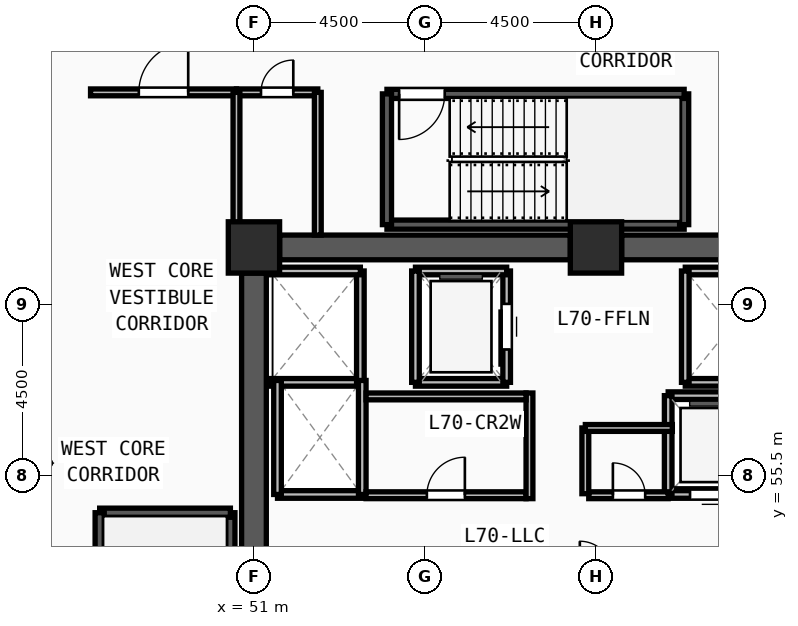
"""IFC4 building model, lengths in metres.
Left out: names, types, materials, properties, quantities, classifications, styles, units other than length and angle.
Written with IfcOpenShell. Run it as: python <this file> out.ifc"""

import sys

from ifc_helpers import new_model, si_unit, direction, frame, frame_2d, origin, origin_2d, place, context, subcontext, project, spatial, rectangle, extrude, source, transform, mapped, element, fill, save


model = new_model("IFC4")
c1 = context("Model", 3, precision=1e-05, world=origin(), true_north=direction((0.0, 1.0)))
c2 = subcontext(c1, "Body", "Model", "MODEL_VIEW")
j1 = project(units=[si_unit("LENGTHUNIT", "METRE"), si_unit("PLANEANGLEUNIT", "RADIAN")], contexts=[c1])
p1 = place(None, origin())
s1 = spatial("IfcSite", under=j1, at=p1, CompositionType="ELEMENT")
p2 = place(p1, origin())
s2 = spatial("IfcBuilding", under=s1, at=p2, CompositionType="ELEMENT")
p3 = place(p2, frame((0.0, 0.0, 270.0)))
s3 = spatial("IfcBuildingStorey", under=s2, at=p3, CompositionType="ELEMENT", Elevation=270.0)
m1 = source(origin(), c2, "Body", "SweptSolid", [
    extrude(rectangle(XDim=1.35, YDim=1.35, at=origin_2d()), origin(), (0.0, 0.0, 1.0), 3.75),
])
for number, where, z_axis, x_axis in (
    (1, (60.0, 61.5, 0.0), (0.0, 0.0, 1.0), (1.0, 0.0, 0.0)),
    (2, (51.0, 61.5, 0.0), (0.0, 0.0, 1.0), (1.0, 0.0, 0.0)),
):
    element("IfcColumn", number, at=place(p3, frame(where, z_axis=z_axis, x_axis=x_axis)), inside=s3, PredefinedType="COLUMN", context=c2, shape_type="MappedRepresentation", body=[
        mapped(m1, transform((0.0, 0.0, 0.0), x_axis=(1.0, 0.0, 0.0), y_axis=(0.0, 1.0, 0.0), z_axis=(0.0, 0.0, 1.0), scale=1.0)),
    ])
for number, where, z_axis, x_axis in (
    (3, (51.675, 61.5, 0.0), (0.0, 0.0, 1.0), (1.0, 0.0, 0.0)),
    (4, (60.675, 61.5, 0.0), (0.0, 0.0, 1.0), (1.0, 0.0, 0.0)),
):
    element("IfcWall", number, at=place(p3, frame(where, z_axis=z_axis, x_axis=x_axis)), inside=s3, PredefinedType="SHEAR", context=c2, shape_type="SweptSolid", body=[
        extrude(rectangle(XDim=7.65, YDim=0.65, at=frame_2d((3.825, 0.0))), origin(), (0.0, 0.0, 1.0), 3.57),
    ])
p4 = place(p3, frame((51.0, 47.175, 0.0), z_axis=(0.0, 0.0, 1.0), x_axis=(0.0, 1.0, 0.0)))
e5 = element("IfcWall", 5, at=p4, inside=s3, PredefinedType="SHEAR", context=c2, shape_type="SweptSolid", body=[
    extrude(rectangle(XDim=13.65, YDim=0.65, at=frame_2d((6.825, 0.0))), origin(), (0.0, 0.0, 1.0), 3.57),
])
p5 = place(p3, frame((50.38, 46.7, 0.0), z_axis=(0.0, 0.0, 1.0), x_axis=(0.0, 1.0, 0.0)))
e6 = element("IfcWall", 6, at=p5, inside=s3, PredefinedType="SOLIDWALL", context=c2, shape_type="SweptSolid", body=[
    extrude(rectangle(XDim=7.82, YDim=0.24, at=frame_2d((3.91, 0.0))), origin(), (0.0, 0.0, 1.0), 3.57),
])
p6 = place(p3, frame((50.38, 54.52, 0.0), z_axis=(0.0, 0.0, 1.0), x_axis=(-1.0, 0.0, 0.0)))
e7 = element("IfcWall", 7, at=p6, inside=s3, PredefinedType="SOLIDWALL", context=c2, shape_type="SweptSolid", body=[
    extrude(rectangle(XDim=3.44, YDim=0.24, at=frame_2d((1.72, 0.0))), origin(), (0.0, 0.0, 1.0), 3.57),
])
p7 = place(p3, frame((46.94, 54.52, 0.0), z_axis=(0.0, 0.0, 1.0), x_axis=(0.0, -1.0, 0.0)))
e8 = element("IfcWall", 8, at=p7, inside=s3, PredefinedType="SOLIDWALL", context=c2, shape_type="SweptSolid", body=[
    extrude(rectangle(XDim=7.82, YDim=0.24, at=frame_2d((3.91, 0.0))), origin(), (0.0, 0.0, 1.0), 3.57),
])
m2 = source(origin(), c2, "Body", "SweptSolid", [
    extrude(rectangle(XDim=1.2, YDim=2.2, at=frame_2d((0.6, 1.1))), frame((0.0, 0.13, 0.0), z_axis=(0.0, -1.0, 0.0), x_axis=(1.0, 0.0, 0.0)), (0.0, 0.0, 1.0), 0.26),
])
p8 = place(p7, frame((6.3, 0.0, 0.0)))
e9 = element("IfcOpeningElement", 9, at=p8, cuts=e8, PredefinedType="OPENING", context=c2, shape_type="MappedRepresentation", body=[
    mapped(m2, transform((0.0, 0.0, 0.0), x_axis=(1.0, 0.0, 0.0), y_axis=(0.0, 1.0, 0.0), z_axis=(0.0, 0.0, 1.0), scale=1.0)),
])
p9 = place(p3, frame((54.5, 62.1, 0.0), z_axis=(0.0, 0.0, 1.0), x_axis=(1.0, 0.0, 0.0)))
e10 = element("IfcWall", 10, at=p9, inside=s3, PredefinedType="SOLIDWALL", context=c2, shape_type="SweptSolid", body=[
    extrude(rectangle(XDim=7.82, YDim=0.24, at=frame_2d((3.91, 0.0))), origin(), (0.0, 0.0, 1.0), 3.57),
])
p10 = place(p3, frame((62.32, 62.1, 0.0), z_axis=(0.0, 0.0, 1.0), x_axis=(0.0, 1.0, 0.0)))
e11 = element("IfcWall", 11, at=p10, inside=s3, PredefinedType="SOLIDWALL", context=c2, shape_type="SweptSolid", body=[
    extrude(rectangle(XDim=3.44, YDim=0.24, at=frame_2d((1.72, 0.0))), origin(), (0.0, 0.0, 1.0), 3.57),
])
p11 = place(p3, frame((62.32, 65.54, 0.0), z_axis=(0.0, 0.0, 1.0), x_axis=(-1.0, 0.0, 0.0)))
e12 = element("IfcWall", 12, at=p11, inside=s3, PredefinedType="SOLIDWALL", context=c2, shape_type="SweptSolid", body=[
    extrude(rectangle(XDim=7.82, YDim=0.24, at=frame_2d((3.91, 0.0))), origin(), (0.0, 0.0, 1.0), 3.57),
])
p12 = place(p11, frame((6.3, 0.0, 0.0)))
e13 = element("IfcOpeningElement", 13, at=p12, cuts=e12, PredefinedType="OPENING", context=c2, shape_type="MappedRepresentation", body=[
    mapped(m2, transform((0.0, 0.0, 0.0), x_axis=(1.0, 0.0, 0.0), y_axis=(0.0, 1.0, 0.0), z_axis=(0.0, 0.0, 1.0), scale=1.0)),
])
p13 = place(p3, frame((54.5, 65.54, 0.0), z_axis=(0.0, 0.0, 1.0), x_axis=(0.0, -1.0, 0.0)))
e14 = element("IfcWall", 14, at=p13, inside=s3, PredefinedType="SOLIDWALL", context=c2, shape_type="SweptSolid", body=[
    extrude(rectangle(XDim=3.44, YDim=0.24, at=frame_2d((1.72, 0.0))), origin(), (0.0, 0.0, 1.0), 3.57),
])
p14 = place(p3, frame((55.25, 57.95, 0.0), z_axis=(0.0, 0.0, 1.0), x_axis=(1.0, 0.0, 0.0)))
e15 = element("IfcWall", 15, at=p14, inside=s3, PredefinedType="SOLIDWALL", context=c2, shape_type="SweptSolid", body=[
    extrude(rectangle(XDim=2.4, YDim=0.2, at=frame_2d((1.2, 0.0))), origin(), (0.0, 0.0, 1.0), 3.57),
])
p15 = place(p3, frame((57.65, 57.95, 0.0), z_axis=(0.0, 0.0, 1.0), x_axis=(0.0, 1.0, 0.0)))
e16 = element("IfcWall", 16, at=p15, inside=s3, PredefinedType="SOLIDWALL", context=c2, shape_type="SweptSolid", body=[
    extrude(rectangle(XDim=2.93, YDim=0.2, at=frame_2d((1.465, 0.0))), origin(), (0.0, 0.0, 1.0), 3.57),
])
m3 = source(origin(), c2, "Body", "SweptSolid", [
    extrude(rectangle(XDim=1.2, YDim=2.3, at=frame_2d((0.6, 1.15))), frame((0.0, 0.11, 0.0), z_axis=(0.0, -1.0, 0.0), x_axis=(1.0, 0.0, 0.0)), (0.0, 0.0, 1.0), 0.22),
])
p16 = place(p15, frame((0.865, 0.0, 0.0)))
e17 = element("IfcOpeningElement", 17, at=p16, cuts=e16, PredefinedType="OPENING", context=c2, shape_type="MappedRepresentation", body=[
    mapped(m3, transform((0.0, 0.0, 0.0), x_axis=(1.0, 0.0, 0.0), y_axis=(0.0, 1.0, 0.0), z_axis=(0.0, 0.0, 1.0), scale=1.0)),
])
p17 = place(p3, frame((57.65, 60.88, 0.0), z_axis=(0.0, 0.0, 1.0), x_axis=(-1.0, 0.0, 0.0)))
e18 = element("IfcWall", 18, at=p17, inside=s3, PredefinedType="SOLIDWALL", context=c2, shape_type="SweptSolid", body=[
    extrude(rectangle(XDim=2.4, YDim=0.2, at=frame_2d((1.2, 0.0))), origin(), (0.0, 0.0, 1.0), 3.57),
])
p18 = place(p3, frame((55.25, 60.88, 0.0), z_axis=(0.0, 0.0, 1.0), x_axis=(0.0, -1.0, 0.0)))
e19 = element("IfcWall", 19, at=p18, inside=s3, PredefinedType="SOLIDWALL", context=c2, shape_type="SweptSolid", body=[
    extrude(rectangle(XDim=2.93, YDim=0.2, at=frame_2d((1.465, 0.0))), origin(), (0.0, 0.0, 1.0), 3.57),
])
for number, where, z_axis, x_axis in (
    (20, (62.35, 57.95, 0.0), (0.0, 0.0, 1.0), (1.0, 0.0, 0.0)),
    (21, (64.75, 60.88, 0.0), (0.0, 0.0, 1.0), (-1.0, 0.0, 0.0)),
):
    element("IfcWall", number, at=place(p3, frame(where, z_axis=z_axis, x_axis=x_axis)), inside=s3, PredefinedType="SOLIDWALL", context=c2, shape_type="SweptSolid", body=[
        extrude(rectangle(XDim=2.4, YDim=0.2, at=frame_2d((1.2, 0.0))), origin(), (0.0, 0.0, 1.0), 3.57),
    ])
p19 = place(p3, frame((62.35, 60.88, 0.0), z_axis=(0.0, 0.0, 1.0), x_axis=(0.0, -1.0, 0.0)))
e22 = element("IfcWall", 22, at=p19, inside=s3, PredefinedType="SOLIDWALL", context=c2, shape_type="SweptSolid", body=[
    extrude(rectangle(XDim=2.93, YDim=0.2, at=frame_2d((1.465, 0.0))), origin(), (0.0, 0.0, 1.0), 3.57),
])
p20 = place(p3, frame((51.4, 57.95, 0.0), z_axis=(0.0, 0.0, 1.0), x_axis=(1.0, 0.0, 0.0)))
e23 = element("IfcWall", 23, at=p20, inside=s3, PredefinedType="SOLIDWALL", context=c2, shape_type="SweptSolid", body=[
    extrude(rectangle(XDim=2.4, YDim=0.2, at=frame_2d((1.2, 0.0))), origin(), (0.0, 0.0, 1.0), 3.57),
])
p21 = place(p3, frame((53.8, 57.95, 0.0), z_axis=(0.0, 0.0, 1.0), x_axis=(0.0, 1.0, 0.0)))
e24 = element("IfcWall", 24, at=p21, inside=s3, PredefinedType="SOLIDWALL", context=c2, shape_type="SweptSolid", body=[
    extrude(rectangle(XDim=2.93, YDim=0.2, at=frame_2d((1.465, 0.0))), origin(), (0.0, 0.0, 1.0), 3.57),
])
p22 = place(p3, frame((53.8, 60.88, 0.0), z_axis=(0.0, 0.0, 1.0), x_axis=(-1.0, 0.0, 0.0)))
e25 = element("IfcWall", 25, at=p22, inside=s3, PredefinedType="SOLIDWALL", context=c2, shape_type="SweptSolid", body=[
    extrude(rectangle(XDim=2.4, YDim=0.2, at=frame_2d((1.2, 0.0))), origin(), (0.0, 0.0, 1.0), 3.57),
])
p23 = place(p3, frame((51.62, 55.0, 0.0), z_axis=(0.0, 0.0, 1.0), x_axis=(1.0, 0.0, 0.0)))
e26 = element("IfcWall", 26, at=p23, inside=s3, PredefinedType="SOLIDWALL", context=c2, shape_type="SweptSolid", body=[
    extrude(rectangle(XDim=2.23, YDim=0.2, at=frame_2d((1.115, 0.0))), origin(), (0.0, 0.0, 1.0), 3.57),
])
for number, where, z_axis, x_axis in (
    (27, (53.85, 55.0, 0.0), (0.0, 0.0, 1.0), (0.0, 1.0, 0.0)),
    (28, (51.62, 58.0, 0.0), (0.0, 0.0, 1.0), (0.0, -1.0, 0.0)),
):
    element("IfcWall", number, at=place(p3, frame(where, z_axis=z_axis, x_axis=x_axis)), inside=s3, PredefinedType="SOLIDWALL", context=c2, shape_type="SweptSolid", body=[
        extrude(rectangle(XDim=3.0, YDim=0.2, at=frame_2d((1.5, 0.0))), origin(), (0.0, 0.0, 1.0), 3.57),
    ])
p24 = place(p3, frame((61.9, 55.0, 0.0), z_axis=(0.0, 0.0, 1.0), x_axis=(1.0, 0.0, 0.0)))
e29 = element("IfcWall", 29, at=p24, inside=s3, PredefinedType="SOLIDWALL", context=c2, shape_type="SweptSolid", body=[
    extrude(rectangle(XDim=2.25, YDim=0.2, at=frame_2d((1.125, 0.0))), origin(), (0.0, 0.0, 1.0), 3.57),
])
m4 = source(origin(), c2, "Body", "SweptSolid", [
    extrude(rectangle(XDim=1.1, YDim=2.2, at=frame_2d((0.55, 1.1))), frame((0.0, 0.11, 0.0), z_axis=(0.0, -1.0, 0.0), x_axis=(1.0, 0.0, 0.0)), (0.0, 0.0, 1.0), 0.22),
])
p25 = place(p24, frame((0.575, 0.0, 0.0)))
e30 = element("IfcOpeningElement", 30, at=p25, cuts=e29, PredefinedType="OPENING", context=c2, shape_type="MappedRepresentation", body=[
    mapped(m4, transform((0.0, 0.0, 0.0), x_axis=(1.0, 0.0, 0.0), y_axis=(0.0, 1.0, 0.0), z_axis=(0.0, 0.0, 1.0), scale=1.0)),
])
p26 = place(p3, frame((64.15, 57.6, 0.0), z_axis=(0.0, 0.0, 1.0), x_axis=(-1.0, 0.0, 0.0)))
e31 = element("IfcWall", 31, at=p26, inside=s3, PredefinedType="SOLIDWALL", context=c2, shape_type="SweptSolid", body=[
    extrude(rectangle(XDim=2.25, YDim=0.2, at=frame_2d((1.125, 0.0))), origin(), (0.0, 0.0, 1.0), 3.57),
])
p27 = place(p3, frame((61.9, 57.6, 0.0), z_axis=(0.0, 0.0, 1.0), x_axis=(0.0, -1.0, 0.0)))
e32 = element("IfcWall", 32, at=p27, inside=s3, PredefinedType="SOLIDWALL", context=c2, shape_type="SweptSolid", body=[
    extrude(rectangle(XDim=2.6, YDim=0.2, at=frame_2d((1.3, 0.0))), origin(), (0.0, 0.0, 1.0), 3.57),
])
p28 = place(p3, frame((53.95, 54.98, 0.0), z_axis=(0.0, 0.0, 1.0), x_axis=(1.0, 0.0, 0.0)))
e33 = element("IfcWall", 33, at=p28, inside=s3, PredefinedType="PARTITIONING", context=c2, shape_type="SweptSolid", body=[
    extrude(rectangle(XDim=4.21, YDim=0.18, at=frame_2d((2.105, 0.0))), origin(), (0.0, 0.0, 1.0), 3.57),
])
m5 = source(origin(), c2, "Body", "SweptSolid", [
    extrude(rectangle(XDim=1.0, YDim=2.2, at=frame_2d((0.5, 1.1))), frame((0.0, 0.1, 0.0), z_axis=(0.0, -1.0, 0.0), x_axis=(1.0, 0.0, 0.0)), (0.0, 0.0, 1.0), 0.2),
])
p29 = place(p28, frame((1.6, 0.0, 0.0)))
e34 = element("IfcOpeningElement", 34, at=p29, cuts=e33, PredefinedType="OPENING", context=c2, shape_type="MappedRepresentation", body=[
    mapped(m5, transform((0.0, 0.0, 0.0), x_axis=(1.0, 0.0, 0.0), y_axis=(0.0, 1.0, 0.0), z_axis=(0.0, 0.0, 1.0), scale=1.0)),
])
p30 = place(p3, frame((59.81, 54.98, 0.0), z_axis=(0.0, 0.0, 1.0), x_axis=(1.0, 0.0, 0.0)))
e35 = element("IfcWall", 35, at=p30, inside=s3, PredefinedType="PARTITIONING", context=c2, shape_type="SweptSolid", body=[
    extrude(rectangle(XDim=2.09, YDim=0.18, at=frame_2d((1.045, 0.0))), origin(), (0.0, 0.0, 1.0), 3.57),
])
m6 = source(origin(), c2, "Body", "SweptSolid", [
    extrude(rectangle(XDim=0.85, YDim=2.1, at=frame_2d((0.425, 1.05))), frame((0.0, 0.1, 0.0), z_axis=(0.0, -1.0, 0.0), x_axis=(1.0, 0.0, 0.0)), (0.0, 0.0, 1.0), 0.2),
])
p31 = place(p30, frame((0.635, 0.0, 0.0)))
e36 = element("IfcOpeningElement", 36, at=p31, cuts=e35, PredefinedType="OPENING", context=c2, shape_type="MappedRepresentation", body=[
    mapped(m6, transform((0.0, 0.0, 0.0), x_axis=(1.0, 0.0, 0.0), y_axis=(0.0, 1.0, 0.0), z_axis=(0.0, 0.0, 1.0), scale=1.0)),
])
p32 = place(p3, frame((50.54, 65.58, 0.0), z_axis=(0.0, 0.0, 1.0), x_axis=(1.0, 0.0, 0.0)))
e37 = element("IfcWall", 37, at=p32, inside=s3, PredefinedType="PARTITIONING", context=c2, shape_type="SweptSolid", body=[
    extrude(rectangle(XDim=2.14, YDim=0.18, at=frame_2d((1.07, 0.0))), origin(), (0.0, 0.0, 1.0), 3.57),
])
p33 = place(p32, frame((0.645, 0.0, 0.0)))
e38 = element("IfcOpeningElement", 38, at=p33, cuts=e37, PredefinedType="OPENING", context=c2, shape_type="MappedRepresentation", body=[
    mapped(m6, transform((0.0, 0.0, 0.0), x_axis=(1.0, 0.0, 0.0), y_axis=(0.0, 1.0, 0.0), z_axis=(0.0, 0.0, 1.0), scale=1.0)),
])
p34 = place(p3, frame((46.7, 65.58, 0.0), z_axis=(0.0, 0.0, 1.0), x_axis=(1.0, 0.0, 0.0)))
e39 = element("IfcWall", 39, at=p34, inside=s3, PredefinedType="PARTITIONING", context=c2, shape_type="SweptSolid", body=[
    extrude(rectangle(XDim=3.84, YDim=0.18, at=frame_2d((1.92, 0.0))), origin(), (0.0, 0.0, 1.0), 3.57),
])
m7 = source(origin(), c2, "Body", "SweptSolid", [
    extrude(rectangle(XDim=1.3, YDim=2.2, at=frame_2d((0.65, 1.1))), frame((0.0, 0.1, 0.0), z_axis=(0.0, -1.0, 0.0), x_axis=(1.0, 0.0, 0.0)), (0.0, 0.0, 1.0), 0.2),
])
p35 = place(p34, frame((1.27, 0.0, 0.0)))
e40 = element("IfcOpeningElement", 40, at=p35, cuts=e39, PredefinedType="OPENING", context=c2, shape_type="MappedRepresentation", body=[
    mapped(m7, transform((0.0, 0.0, 0.0), x_axis=(1.0, 0.0, 0.0), y_axis=(0.0, 1.0, 0.0), z_axis=(0.0, 0.0, 1.0), scale=1.0)),
])
p36 = place(p3, frame((59.72, 55.02, 0.0), z_axis=(0.0, 0.0, 1.0), x_axis=(0.0, 1.0, 0.0)))
e41 = element("IfcWall", 41, at=p36, inside=s3, PredefinedType="PARTITIONING", context=c2, shape_type="SweptSolid", body=[
    extrude(rectangle(XDim=1.73, YDim=0.18, at=frame_2d((0.865, 0.0))), origin(), (0.0, 0.0, 1.0), 3.57),
])
p37 = place(p3, frame((59.72, 56.75, 0.0), z_axis=(0.0, 0.0, 1.0), x_axis=(1.0, 0.0, 0.0)))
e42 = element("IfcWall", 42, at=p37, inside=s3, PredefinedType="PARTITIONING", context=c2, shape_type="SweptSolid", body=[
    extrude(rectangle(XDim=2.29, YDim=0.18, at=frame_2d((1.145, 0.0))), origin(), (0.0, 0.0, 1.0), 3.57),
])
p38 = place(p3, frame((50.54, 61.95, 0.0), z_axis=(0.0, 0.0, 1.0), x_axis=(0.0, 1.0, 0.0)))
e43 = element("IfcWall", 43, at=p38, inside=s3, PredefinedType="PARTITIONING", context=c2, shape_type="SweptSolid", body=[
    extrude(rectangle(XDim=3.63, YDim=0.18, at=frame_2d((1.815, 0.0))), origin(), (0.0, 0.0, 1.0), 3.57),
])
p39 = place(p3, frame((52.68, 61.825, 0.0), z_axis=(0.0, 0.0, 1.0), x_axis=(0.0, 1.0, 0.0)))
e44 = element("IfcWall", 44, at=p39, inside=s3, PredefinedType="PARTITIONING", context=c2, shape_type="SweptSolid", body=[
    extrude(rectangle(XDim=3.755, YDim=0.18, at=frame_2d((1.877, 0.0))), origin(), (0.0, 0.0, 1.0), 3.57),
])
p40 = place(p3, frame((58.25, 54.89, 0.0), z_axis=(0.0, 0.0, 1.0), x_axis=(0.0, 1.0, 0.0)))
e45 = element("IfcWall", 45, at=p40, inside=s3, PredefinedType="PARTITIONING", context=c2, shape_type="SweptSolid", body=[
    extrude(rectangle(XDim=2.78, YDim=0.18, at=frame_2d((1.39, 0.0))), origin(), (0.0, 0.0, 1.0), 3.57),
])
p41 = place(p3, frame((53.95, 57.58, 0.0), z_axis=(0.0, 0.0, 1.0), x_axis=(1.0, 0.0, 0.0)))
e46 = element("IfcWall", 46, at=p41, inside=s3, PredefinedType="PARTITIONING", context=c2, shape_type="SweptSolid", body=[
    extrude(rectangle(XDim=4.21, YDim=0.18, at=frame_2d((2.105, 0.0))), origin(), (0.0, 0.0, 1.0), 3.57),
])
m8 = source(origin(), c2, "Body", "SweptSolid", [
    extrude(rectangle(XDim=1.2, YDim=2.2, at=frame_2d((0.6, 1.1))), frame((0.0, 0.025, 0.0), z_axis=(0.0, -1.0, 0.0), x_axis=(1.0, 0.0, 0.0)), (0.0, 0.0, 1.0), 0.05),
])
p42 = place(p12, origin())
e47 = element("IfcDoor", 47, at=p42, inside=s3, OperationType="SINGLE_SWING_RIGHT", PredefinedType="DOOR", context=c2, shape_type="MappedRepresentation", body=[
    mapped(m8, transform((0.0, 0.0, 0.0), x_axis=(1.0, 0.0, 0.0), y_axis=(0.0, 1.0, 0.0), z_axis=(0.0, 0.0, 1.0), scale=1.0)),
])
fill(e13, e47)
m9 = source(origin(), c2, "Body", "SweptSolid", [
    extrude(rectangle(XDim=1.2, YDim=2.3, at=frame_2d((0.6, 1.15))), frame((0.0, 0.025, 0.0), z_axis=(0.0, -1.0, 0.0), x_axis=(1.0, 0.0, 0.0)), (0.0, 0.0, 1.0), 0.05),
])
p43 = place(p16, origin())
e48 = element("IfcDoor", 48, at=p43, inside=s3, OperationType="SLIDING_TO_LEFT", PredefinedType="DOOR", context=c2, shape_type="MappedRepresentation", body=[
    mapped(m9, transform((0.0, 0.0, 0.0), x_axis=(1.0, 0.0, 0.0), y_axis=(0.0, 1.0, 0.0), z_axis=(0.0, 0.0, 1.0), scale=1.0)),
])
fill(e17, e48)
m10 = source(origin(), c2, "Body", "SweptSolid", [
    extrude(rectangle(XDim=1.1, YDim=2.2, at=frame_2d((0.55, 1.1))), frame((0.0, 0.025, 0.0), z_axis=(0.0, -1.0, 0.0), x_axis=(1.0, 0.0, 0.0)), (0.0, 0.0, 1.0), 0.05),
])
p44 = place(p25, origin())
e49 = element("IfcDoor", 49, at=p44, inside=s3, OperationType="SLIDING_TO_LEFT", PredefinedType="DOOR", context=c2, shape_type="MappedRepresentation", body=[
    mapped(m10, transform((0.0, 0.0, 0.0), x_axis=(1.0, 0.0, 0.0), y_axis=(0.0, 1.0, 0.0), z_axis=(0.0, 0.0, 1.0), scale=1.0)),
])
fill(e30, e49)
m11 = source(origin(), c2, "Body", "SweptSolid", [
    extrude(rectangle(XDim=1.0, YDim=2.2, at=frame_2d((0.5, 1.1))), frame((0.0, 0.025, 0.0), z_axis=(0.0, -1.0, 0.0), x_axis=(1.0, 0.0, 0.0)), (0.0, 0.0, 1.0), 0.05),
])
p45 = place(p29, origin())
e50 = element("IfcDoor", 50, at=p45, inside=s3, OperationType="SINGLE_SWING_RIGHT", PredefinedType="DOOR", context=c2, shape_type="MappedRepresentation", body=[
    mapped(m11, transform((0.0, 0.0, 0.0), x_axis=(1.0, 0.0, 0.0), y_axis=(0.0, 1.0, 0.0), z_axis=(0.0, 0.0, 1.0), scale=1.0)),
])
fill(e34, e50)
m12 = source(origin(), c2, "Body", "SweptSolid", [
    extrude(rectangle(XDim=0.85, YDim=2.1, at=frame_2d((0.425, 1.05))), frame((0.0, 0.025, 0.0), z_axis=(0.0, -1.0, 0.0), x_axis=(1.0, 0.0, 0.0)), (0.0, 0.0, 1.0), 0.05),
])
p46 = place(p31, origin())
e51 = element("IfcDoor", 51, at=p46, inside=s3, OperationType="SINGLE_SWING_LEFT", PredefinedType="DOOR", context=c2, shape_type="MappedRepresentation", body=[
    mapped(m12, transform((0.0, 0.0, 0.0), x_axis=(1.0, 0.0, 0.0), y_axis=(0.0, 1.0, 0.0), z_axis=(0.0, 0.0, 1.0), scale=1.0)),
])
fill(e36, e51)
p47 = place(p33, origin())
e52 = element("IfcDoor", 52, at=p47, inside=s3, OperationType="SINGLE_SWING_RIGHT", PredefinedType="DOOR", context=c2, shape_type="MappedRepresentation", body=[
    mapped(m12, transform((0.0, 0.0, 0.0), x_axis=(1.0, 0.0, 0.0), y_axis=(0.0, 1.0, 0.0), z_axis=(0.0, 0.0, 1.0), scale=1.0)),
])
fill(e38, e52)
m13 = source(origin(), c2, "Body", "SweptSolid", [
    extrude(rectangle(XDim=1.3, YDim=2.2, at=frame_2d((0.65, 1.1))), frame((0.0, 0.025, 0.0), z_axis=(0.0, -1.0, 0.0), x_axis=(1.0, 0.0, 0.0)), (0.0, 0.0, 1.0), 0.05),
])
p48 = place(p35, origin())
e53 = element("IfcDoor", 53, at=p48, inside=s3, OperationType="SINGLE_SWING_RIGHT", PredefinedType="DOOR", context=c2, shape_type="MappedRepresentation", body=[
    mapped(m13, transform((0.0, 0.0, 0.0), x_axis=(1.0, 0.0, 0.0), y_axis=(0.0, 1.0, 0.0), z_axis=(0.0, 0.0, 1.0), scale=1.0)),
])
fill(e40, e53)
save(model, sys.argv[1])
